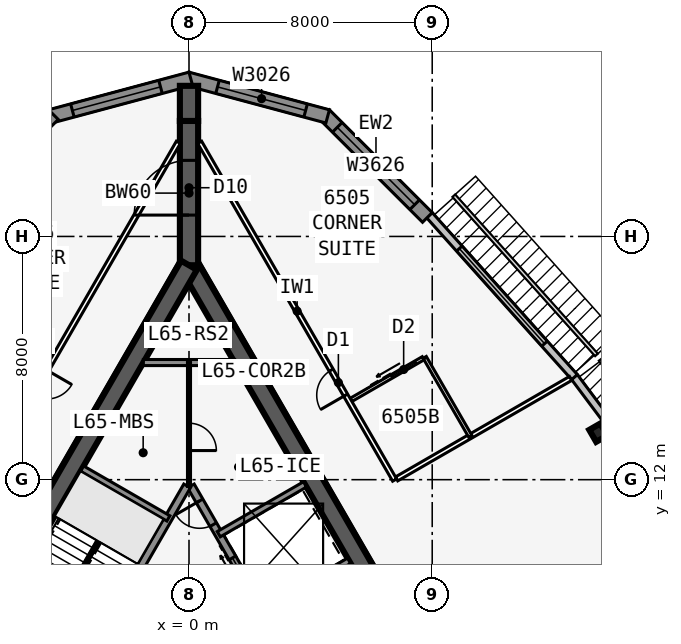
"""IFC4 building model, lengths in metres.
Left out: names, types, materials, properties, quantities, classifications, styles, units other than length and angle.
Written with IfcOpenShell. Run it as: python <this file> out.ifc"""

import sys

from ifc_helpers import new_model, si_unit, direction, frame, frame_2d, origin, origin_2d, place, context, subcontext, project, spatial, polyline, rectangle, i_section, outline, extrude, element, fill, save


model = new_model("IFC4")
c1 = context("Model", 3, precision=1e-05, world=origin(), true_north=direction((0.0, 1.0)))
c2 = subcontext(c1, "Body", "Model", "MODEL_VIEW")
j1 = project(units=[si_unit("LENGTHUNIT", "METRE"), si_unit("PLANEANGLEUNIT", "RADIAN")], contexts=[c1])
p1 = place(None, origin())
s1 = spatial("IfcSite", under=j1, at=p1, CompositionType="ELEMENT")
p2 = place(p1, origin())
s2 = spatial("IfcBuilding", under=s1, at=p2, CompositionType="ELEMENT")
p3 = place(p2, frame((0.0, 0.0, 246.5)))
s3 = spatial("IfcBuildingStorey", under=s2, at=p3, CompositionType="ELEMENT", Elevation=246.5)
p4 = place(p3, frame((16.5, -9.526, 0.0), z_axis=(0.0, 0.0, 1.0), x_axis=(-0.499999749417, 0.866025548458, 0.0)))
e1 = element("IfcWall", 1, at=p4, inside=s3, PredefinedType="SHEAR", context=c2, shape_type="SweptSolid", body=[
    extrude(rectangle(XDim=33.0, YDim=0.6, at=frame_2d((16.5, 0.0))), origin(), (0.0, 0.0, 1.0), 3.6),
])
p5 = place(p4, frame((14.15, 0.0, 0.0)))
e2 = element("IfcOpeningElement", 2, at=p5, cuts=e1, PredefinedType="OPENING", context=c2, shape_type="SweptSolid", body=[
    extrude(rectangle(XDim=1.8, YDim=2.13, at=frame_2d((0.9, 1.065))), frame((0.0, 0.31, 0.0), z_axis=(0.0, -1.0, 0.0), x_axis=(1.0, 0.0, 0.0)), (0.0, 0.0, 1.0), 0.62),
])
p6 = place(p4, frame((12.6, 0.0, 0.0)))
e3 = element("IfcOpeningElement", 3, at=p6, cuts=e1, PredefinedType="OPENING", context=c2, shape_type="SweptSolid", body=[
    extrude(rectangle(XDim=1.0, YDim=2.13, at=frame_2d((0.5, 1.065))), frame((0.0, 0.31, 0.0), z_axis=(0.0, -1.0, 0.0), x_axis=(1.0, 0.0, 0.0)), (0.0, 0.0, 1.0), 0.62),
])
p7 = place(p3, frame((5.379, 2.586, 0.0), z_axis=(0.0, 0.0, 1.0), x_axis=(-0.500001375892, 0.866024609411, 0.0)))
e4 = element("IfcWall", 4, at=p7, inside=s3, PredefinedType="SOLIDWALL", context=c2, shape_type="SweptSolid", body=[
    extrude(rectangle(XDim=10.633, YDim=0.25, at=frame_2d((5.316, 0.0))), origin(), (0.0, 0.0, 1.0), 3.435),
])
p8 = place(p7, frame((9.164, 0.0, 0.0)))
e5 = element("IfcOpeningElement", 5, at=p8, cuts=e4, PredefinedType="OPENING", context=c2, shape_type="SweptSolid", body=[
    extrude(rectangle(XDim=0.9, YDim=2.13, at=frame_2d((0.45, 1.065))), frame((0.0, 0.135, 0.0), z_axis=(0.0, -1.0, 0.0), x_axis=(1.0, 0.0, 0.0)), (0.0, 0.0, 1.0), 0.27),
])
p9 = place(p7, frame((1.0, 0.0, 0.0)))
e6 = element("IfcOpeningElement", 6, at=p9, cuts=e4, PredefinedType="OPENING", context=c2, shape_type="SweptSolid", body=[
    extrude(rectangle(XDim=1.1, YDim=2.13, at=frame_2d((0.55, 1.065))), frame((0.0, 0.135, 0.0), z_axis=(0.0, -1.0, 0.0), x_axis=(1.0, 0.0, 0.0)), (0.0, 0.0, 1.0), 0.27),
])
p10 = place(p7, frame((3.9, 0.0, 0.0)))
e7 = element("IfcOpeningElement", 7, at=p10, cuts=e4, PredefinedType="OPENING", context=c2, shape_type="SweptSolid", body=[
    extrude(rectangle(XDim=1.1, YDim=2.13, at=frame_2d((0.55, 1.065))), frame((0.0, 0.135, 0.0), z_axis=(0.0, -1.0, 0.0), x_axis=(1.0, 0.0, 0.0)), (0.0, 0.0, 1.0), 0.27),
])
p11 = place(p7, frame((6.8, 0.0, 0.0)))
e8 = element("IfcOpeningElement", 8, at=p11, cuts=e4, PredefinedType="OPENING", context=c2, shape_type="SweptSolid", body=[
    extrude(rectangle(XDim=1.1, YDim=2.13, at=frame_2d((0.55, 1.065))), frame((0.0, 0.135, 0.0), z_axis=(0.0, -1.0, 0.0), x_axis=(1.0, 0.0, 0.0)), (0.0, 0.0, 1.0), 0.27),
])
for number, where, z_axis, x_axis in (
    (9, (2.429, 7.696, 0.0), (0.0, 0.0, 1.0), (0.866, 0.5, 0.0)),
    (10, (0.979, 10.207, 0.0), (0.0, 0.0, 1.0), (0.866, 0.5, 0.0)),
):
    element("IfcWall", number, at=place(p3, frame(where, z_axis=z_axis, x_axis=x_axis)), inside=s3, PredefinedType="SOLIDWALL", context=c2, shape_type="SweptSolid", body=[
        extrude(rectangle(XDim=3.275, YDim=0.2, at=frame_2d((1.637, 0.0))), origin(), (0.0, 0.0, 1.0), 3.435),
    ])
p12 = place(p3, frame((0.0, 19.052, 0.0), z_axis=(0.0, 0.0, 1.0), x_axis=(-0.499999749417, -0.866025548458, 0.0)))
e11 = element("IfcWall", 11, at=p12, inside=s3, PredefinedType="SHEAR", context=c2, shape_type="SweptSolid", body=[
    extrude(rectangle(XDim=33.0, YDim=0.6, at=frame_2d((16.5, 0.0))), origin(), (0.0, 0.0, 1.0), 3.6),
])
p13 = place(p12, frame((14.15, 0.0, 0.0)))
e12 = element("IfcOpeningElement", 12, at=p13, cuts=e11, PredefinedType="OPENING", context=c2, shape_type="SweptSolid", body=[
    extrude(rectangle(XDim=1.8, YDim=2.13, at=frame_2d((0.9, 1.065))), frame((0.0, 0.31, 0.0), z_axis=(0.0, -1.0, 0.0), x_axis=(1.0, 0.0, 0.0)), (0.0, 0.0, 1.0), 0.62),
])
p14 = place(p12, frame((12.6, 0.0, 0.0)))
e13 = element("IfcOpeningElement", 13, at=p14, cuts=e11, PredefinedType="OPENING", context=c2, shape_type="SweptSolid", body=[
    extrude(rectangle(XDim=1.0, YDim=2.13, at=frame_2d((0.5, 1.065))), frame((0.0, 0.31, 0.0), z_axis=(0.0, -1.0, 0.0), x_axis=(1.0, 0.0, 0.0)), (0.0, 0.0, 1.0), 0.62),
])
p15 = place(p3, frame((-0.062, 11.794, 0.0), z_axis=(0.0, 0.0, 1.0), x_axis=(-0.500006680225, -0.86602154692, 0.0)))
e14 = element("IfcWall", 14, at=p15, inside=s3, PredefinedType="SOLIDWALL", context=c2, shape_type="SweptSolid", body=[
    extrude(rectangle(XDim=7.733, YDim=0.25, at=frame_2d((3.866, 0.0))), origin(), (0.0, 0.0, 1.0), 3.435),
])
p16 = place(p3, frame((-0.679, 10.727, 0.0), z_axis=(0.0, 0.0, 1.0), x_axis=(-0.866027924134, 0.499995634601, 0.0)))
e15 = element("IfcWall", 15, at=p16, inside=s3, PredefinedType="SOLIDWALL", context=c2, shape_type="SweptSolid", body=[
    extrude(rectangle(XDim=3.275, YDim=0.2, at=frame_2d((1.637, 0.0))), origin(), (0.0, 0.0, 1.0), 3.435),
])
p17 = place(p3, frame((0.0, 19.052, 0.0), z_axis=(0.0, 0.0, 1.0), x_axis=(0.0, 1.0, 0.0)))
e16 = element("IfcWall", 16, at=p17, inside=s3, PredefinedType="SHEAR", context=c2, shape_type="SweptSolid", body=[
    extrude(rectangle(XDim=4.746, YDim=0.6, at=frame_2d((2.373, 0.0))), origin(), (0.0, 0.0, 1.0), 3.6),
])
p18 = place(p17, frame((1.65, 0.0, 0.0)))
e17 = element("IfcOpeningElement", 17, at=p18, cuts=e16, PredefinedType="OPENING", context=c2, shape_type="SweptSolid", body=[
    extrude(rectangle(XDim=1.8, YDim=2.13, at=frame_2d((0.9, 1.065))), frame((0.0, 0.31, 0.0), z_axis=(0.0, -1.0, 0.0), x_axis=(1.0, 0.0, 0.0)), (0.0, 0.0, 1.0), 0.62),
])
p19 = place(p3, frame((0.0, 23.799, 0.0), z_axis=(0.0, 0.0, 1.0), x_axis=(0.0, 1.0, 0.0)))
e18 = element("IfcWall", 18, at=p19, inside=s3, PredefinedType="SHEAR", context=c2, shape_type="SweptSolid", body=[
    extrude(rectangle(XDim=1.155, YDim=0.6, at=frame_2d((0.577, 0.0))), origin(), (0.0, 0.0, 1.0), 3.6),
])
p20 = place(p3, frame((13.461, 13.545, 0.0), z_axis=(0.0, 0.0, 1.0), x_axis=(0.866025403784, 0.5, 0.0)))
e19 = element("IfcColumn", 19, at=p20, inside=s3, PredefinedType="COLUMN", context=c2, shape_type="SweptSolid", body=[
    extrude(i_section(OverallWidth=0.419, OverallDepth=0.455, WebThickness=0.042, FlangeThickness=0.068, at=origin_2d()), origin(), (0.0, 0.0, 1.0), 3.6),
])
p21 = place(p3, frame((13.881, 13.771, 0.0), z_axis=(0.0, 0.0, 1.0), x_axis=(-0.599650843534, 0.800261748335, 0.0)))
e20 = element("IfcWall", 20, at=p21, inside=s3, PredefinedType="STANDARD", context=c2, shape_type="SweptSolid", body=[
    extrude(rectangle(XDim=2.014, YDim=0.25, at=frame_2d((1.007, 0.0))), origin(), (0.0, 0.0, 1.0), 3.435),
])
p22 = place(p3, frame((12.68, 15.374, 0.0), z_axis=(0.0, 0.0, 1.0), x_axis=(-0.667303550892, 0.744785855778, 0.0)))
e21 = element("IfcWall", 21, at=p22, inside=s3, PredefinedType="STANDARD", context=c2, shape_type="SweptSolid", body=[
    extrude(rectangle(XDim=7.153, YDim=0.25, at=frame_2d((3.576, 0.0))), origin(), (0.0, 0.0, 1.0), 3.435),
])
p23 = place(p22, frame((1.476, 0.0, 0.45)))
e22 = element("IfcOpeningElement", 22, at=p23, cuts=e21, PredefinedType="OPENING", context=c2, shape_type="SweptSolid", body=[
    extrude(rectangle(XDim=4.2, YDim=2.6, at=frame_2d((2.1, 1.3))), frame((0.0, 0.135, 0.0), z_axis=(0.0, -1.0, 0.0), x_axis=(1.0, 0.0, 0.0)), (0.0, 0.0, 1.0), 0.27),
])
p24 = place(p3, frame((7.841, 20.625, 0.0), z_axis=(0.0, 0.0, 1.0), x_axis=(-0.707106781187, 0.707106781187, 0.0)))
e23 = element("IfcWall", 23, at=p24, inside=s3, PredefinedType="SOLIDWALL", context=c2, shape_type="SweptSolid", body=[
    extrude(rectangle(XDim=4.781, YDim=0.45, at=frame_2d((2.391, 0.0))), origin(), (0.0, 0.0, 1.0), 3.435),
])
p25 = place(p24, frame((0.591, 0.0, 0.45)))
e24 = element("IfcOpeningElement", 24, at=p25, cuts=e23, PredefinedType="OPENING", context=c2, shape_type="SweptSolid", body=[
    extrude(rectangle(XDim=3.6, YDim=2.6, at=frame_2d((1.8, 1.3))), frame((0.0, 0.235, 0.0), z_axis=(0.0, -1.0, 0.0), x_axis=(1.0, 0.0, 0.0)), (0.0, 0.0, 1.0), 0.47),
])
p26 = place(p3, frame((4.561, 23.948, 0.0), z_axis=(0.0, 0.0, 1.0), x_axis=(-0.965926628191, 0.258816052347, 0.0)))
e25 = element("IfcWall", 25, at=p26, inside=s3, PredefinedType="SOLIDWALL", context=c2, shape_type="SweptSolid", body=[
    extrude(outline(polyline([(4.781, 0.225), (4.722, 0.225), (4.375, 0.132), (4.351, 0.225), (0.0, 0.225), (0.0, -0.225), (4.781, -0.225), (4.781, 0.225)])), origin(), (0.0, 0.0, 1.0), 3.435),
])
p27 = place(p26, frame((0.75, 0.0, 0.45)))
e26 = element("IfcOpeningElement", 26, at=p27, cuts=e25, PredefinedType="OPENING", context=c2, shape_type="SweptSolid", body=[
    extrude(rectangle(XDim=3.0, YDim=2.6, at=frame_2d((1.5, 1.3))), frame((0.0, 0.235, 0.0), z_axis=(0.0, -1.0, 0.0), x_axis=(1.0, 0.0, 0.0)), (0.0, 0.0, 1.0), 0.47),
])
p28 = place(p3, frame((0.058, 25.186, 0.0), z_axis=(0.0, 0.0, 1.0), x_axis=(-0.965926628191, -0.258816052347, 0.0)))
e27 = element("IfcWall", 27, at=p28, inside=s3, PredefinedType="SOLIDWALL", context=c2, shape_type="SweptSolid", body=[
    extrude(outline(polyline([(4.781, 0.225), (0.431, 0.225), (0.406, 0.132), (0.059, 0.225), (0.0, 0.225), (0.0, -0.225), (4.781, -0.225), (4.781, 0.225)])), origin(), (0.0, 0.0, 1.0), 3.435),
])
p29 = place(p28, frame((1.031, 0.0, 0.45)))
e28 = element("IfcOpeningElement", 28, at=p29, cuts=e27, PredefinedType="OPENING", context=c2, shape_type="SweptSolid", body=[
    extrude(rectangle(XDim=3.0, YDim=2.6, at=frame_2d((1.5, 1.3))), frame((0.0, 0.235, 0.0), z_axis=(0.0, -1.0, 0.0), x_axis=(1.0, 0.0, 0.0)), (0.0, 0.0, 1.0), 0.47),
])
p30 = place(p3, frame((-4.46, 24.007, 0.0), z_axis=(0.0, 0.0, 1.0), x_axis=(-0.707106781187, -0.707106781187, 0.0)))
e29 = element("IfcWall", 29, at=p30, inside=s3, PredefinedType="SOLIDWALL", context=c2, shape_type="SweptSolid", body=[
    extrude(rectangle(XDim=4.781, YDim=0.45, at=frame_2d((2.391, 0.0))), origin(), (0.0, 0.0, 1.0), 3.435),
])
p31 = place(p30, frame((0.591, 0.0, 0.45)))
e30 = element("IfcOpeningElement", 30, at=p31, cuts=e29, PredefinedType="OPENING", context=c2, shape_type="SweptSolid", body=[
    extrude(rectangle(XDim=3.6, YDim=2.6, at=frame_2d((1.8, 1.3))), frame((0.0, 0.235, 0.0), z_axis=(0.0, -1.0, 0.0), x_axis=(1.0, 0.0, 0.0)), (0.0, 0.0, 1.0), 0.47),
])
p32 = place(p3, frame((6.763, 11.988, 0.0), z_axis=(0.0, 0.0, 1.0), x_axis=(-0.499993758181, 0.86602900747, 0.0)))
e31 = element("IfcWall", 31, at=p32, inside=s3, PredefinedType="PARTITIONING", context=c2, shape_type="SweptSolid", body=[
    extrude(rectangle(XDim=12.827, YDim=0.15, at=frame_2d((6.414, 0.0))), origin(), (0.0, 0.0, 1.0), 3.435),
])
p33 = place(p32, frame((3.225, 0.0, 0.0)))
e32 = element("IfcOpeningElement", 32, at=p33, cuts=e31, PredefinedType="OPENING", context=c2, shape_type="SweptSolid", body=[
    extrude(rectangle(XDim=0.95, YDim=2.13, at=frame_2d((0.475, 1.065))), frame((0.0, 0.085, 0.0), z_axis=(0.0, -1.0, 0.0), x_axis=(1.0, 0.0, 0.0)), (0.0, 0.0, 1.0), 0.17),
])
p34 = place(p3, frame((6.829, 12.025, 0.0), z_axis=(0.0, 0.0, 1.0), x_axis=(0.866029323189, 0.499993211332, 0.0)))
e33 = element("IfcWall", 33, at=p34, inside=s3, PredefinedType="PARTITIONING", context=c2, shape_type="SweptSolid", body=[
    extrude(rectangle(XDim=6.608, YDim=0.15, at=frame_2d((3.304, 0.0))), origin(), (0.0, 0.0, 1.0), 2.678),
])
p35 = place(p3, frame((9.253, 13.425, 0.0), z_axis=(0.0, 0.0, 1.0), x_axis=(-0.499990139034, 0.866031096941, 0.0)))
e34 = element("IfcWall", 34, at=p35, inside=s3, PredefinedType="PLUMBINGWALL", context=c2, shape_type="SweptSolid", body=[
    extrude(rectangle(XDim=3.0, YDim=0.12, at=frame_2d((1.5, 0.0))), origin(), (0.0, 0.0, 1.0), 3.435),
])
p36 = place(p3, frame((5.329, 14.623, 0.0), z_axis=(0.0, 0.0, 1.0), x_axis=(0.865997131366, 0.500048966069, 0.0)))
e35 = element("IfcWall", 35, at=p36, inside=s3, PredefinedType="PLUMBINGWALL", context=c2, shape_type="SweptSolid", body=[
    extrude(rectangle(XDim=2.74, YDim=0.12, at=frame_2d((1.37, 0.0))), origin(), (0.0, 0.0, 1.0), 3.435),
])
p37 = place(p36, frame((1.55, 0.0, 0.0)))
e36 = element("IfcOpeningElement", 36, at=p37, cuts=e35, PredefinedType="OPENING", context=c2, shape_type="SweptSolid", body=[
    extrude(rectangle(XDim=0.9, YDim=2.13, at=frame_2d((0.45, 1.065))), frame((0.0, 0.07, 0.0), z_axis=(0.0, -1.0, 0.0), x_axis=(1.0, 0.0, 0.0)), (0.0, 0.0, 1.0), 0.14),
])
p38 = place(p3, frame((-0.35, 23.096, 0.0), z_axis=(0.0, 0.0, 1.0), x_axis=(-0.499998875317, -0.866026053119, 0.0)))
e37 = element("IfcWall", 37, at=p38, inside=s3, PredefinedType="PARTITIONING", context=c2, shape_type="SweptSolid", body=[
    extrude(rectangle(XDim=39.654, YDim=0.15, at=frame_2d((19.827, 0.0))), origin(), (0.0, 0.0, 1.0), 3.435),
])
p39 = place(p38, frame((8.652, 0.0, 0.0)))
e38 = element("IfcOpeningElement", 38, at=p39, cuts=e37, PredefinedType="OPENING", context=c2, shape_type="SweptSolid", body=[
    extrude(rectangle(XDim=0.95, YDim=2.13, at=frame_2d((0.475, 1.065))), frame((0.0, 0.085, 0.0), z_axis=(0.0, -1.0, 0.0), x_axis=(1.0, 0.0, 0.0)), (0.0, 0.0, 1.0), 0.17),
])
p40 = place(p38, frame((16.052, 0.0, 0.0)))
e39 = element("IfcOpeningElement", 39, at=p40, cuts=e37, PredefinedType="OPENING", context=c2, shape_type="SweptSolid", body=[
    extrude(rectangle(XDim=0.95, YDim=2.13, at=frame_2d((0.475, 1.065))), frame((0.0, 0.085, 0.0), z_axis=(0.0, -1.0, 0.0), x_axis=(1.0, 0.0, 0.0)), (0.0, 0.0, 1.0), 0.17),
])
p41 = place(p38, frame((23.052, 0.0, 0.0)))
e40 = element("IfcOpeningElement", 40, at=p41, cuts=e37, PredefinedType="OPENING", context=c2, shape_type="SweptSolid", body=[
    extrude(rectangle(XDim=0.95, YDim=2.13, at=frame_2d((0.475, 1.065))), frame((0.0, 0.085, 0.0), z_axis=(0.0, -1.0, 0.0), x_axis=(1.0, 0.0, 0.0)), (0.0, 0.0, 1.0), 0.17),
])
p42 = place(p38, frame((30.052, 0.0, 0.0)))
e41 = element("IfcOpeningElement", 41, at=p42, cuts=e37, PredefinedType="OPENING", context=c2, shape_type="SweptSolid", body=[
    extrude(rectangle(XDim=0.95, YDim=2.13, at=frame_2d((0.475, 1.065))), frame((0.0, 0.085, 0.0), z_axis=(0.0, -1.0, 0.0), x_axis=(1.0, 0.0, 0.0)), (0.0, 0.0, 1.0), 0.17),
])
p43 = place(p3, frame((-1.501, 15.853, 0.0), z_axis=(0.0, 0.0, 1.0), x_axis=(1.0, 0.0, 0.0)))
e42 = element("IfcWall", 42, at=p43, inside=s3, PredefinedType="SOLIDWALL", context=c2, shape_type="SweptSolid", body=[
    extrude(rectangle(XDim=3.002, YDim=0.2, at=frame_2d((1.501, 0.0))), origin(), (0.0, 0.0, 1.0), 3.435),
])
p44 = place(p3, frame((0.0, 15.853, 0.0), z_axis=(0.0, 0.0, 1.0), x_axis=(0.0, -1.0, 0.0)))
e43 = element("IfcWall", 43, at=p44, inside=s3, PredefinedType="PARTITIONING", context=c2, shape_type="SweptSolid", body=[
    extrude(rectangle(XDim=4.075, YDim=0.1, at=frame_2d((2.038, 0.0))), origin(), (0.0, 0.0, 1.0), 3.435),
])
p45 = place(p44, frame((1.995, 0.0, 0.0)))
e44 = element("IfcOpeningElement", 44, at=p45, cuts=e43, PredefinedType="OPENING", context=c2, shape_type="SweptSolid", body=[
    extrude(rectangle(XDim=0.9, YDim=2.13, at=frame_2d((0.45, 1.065))), frame((0.0, 0.06, 0.0), z_axis=(0.0, -1.0, 0.0), x_axis=(1.0, 0.0, 0.0)), (0.0, 0.0, 1.0), 0.12),
])
p46 = place(p3, frame((-2.988, 9.978, 0.0), z_axis=(0.0, 0.0, 1.0), x_axis=(-0.499992232847, -0.866029888106, 0.0)))
e45 = element("IfcWall", 45, at=p46, inside=s3, PredefinedType="SOLIDWALL", context=c2, shape_type="SweptSolid", body=[
    extrude(rectangle(XDim=2.794, YDim=0.1, at=frame_2d((1.397, 0.0))), origin(), (0.0, 0.0, 1.0), 3.6),
])
p47 = place(p23, origin())
e46 = element("IfcWindow", 46, at=p47, inside=s3, PartitioningType="SINGLE_PANEL", PredefinedType="WINDOW", context=c2, shape_type="SweptSolid", body=[
    extrude(rectangle(XDim=4.2, YDim=2.6, at=frame_2d((2.1, 1.3))), frame((0.0, 0.03, 0.0), z_axis=(0.0, -1.0, 0.0), x_axis=(1.0, 0.0, 0.0)), (0.0, 0.0, 1.0), 0.06),
])
fill(e22, e46)
p48 = place(p25, origin())
e47 = element("IfcWindow", 47, at=p48, inside=s3, PartitioningType="SINGLE_PANEL", PredefinedType="WINDOW", context=c2, shape_type="SweptSolid", body=[
    extrude(rectangle(XDim=3.6, YDim=2.6, at=frame_2d((1.8, 1.3))), frame((0.0, 0.03, 0.0), z_axis=(0.0, -1.0, 0.0), x_axis=(1.0, 0.0, 0.0)), (0.0, 0.0, 1.0), 0.06),
])
fill(e24, e47)
p49 = place(p27, origin())
e48 = element("IfcWindow", 48, at=p49, inside=s3, PartitioningType="SINGLE_PANEL", PredefinedType="WINDOW", context=c2, shape_type="SweptSolid", body=[
    extrude(rectangle(XDim=3.0, YDim=2.6, at=frame_2d((1.5, 1.3))), frame((0.0, 0.03, 0.0), z_axis=(0.0, -1.0, 0.0), x_axis=(1.0, 0.0, 0.0)), (0.0, 0.0, 1.0), 0.06),
])
fill(e26, e48)
p50 = place(p29, origin())
e49 = element("IfcWindow", 49, at=p50, inside=s3, PartitioningType="SINGLE_PANEL", PredefinedType="WINDOW", context=c2, shape_type="SweptSolid", body=[
    extrude(rectangle(XDim=3.0, YDim=2.6, at=frame_2d((1.5, 1.3))), frame((0.0, 0.03, 0.0), z_axis=(0.0, -1.0, 0.0), x_axis=(1.0, 0.0, 0.0)), (0.0, 0.0, 1.0), 0.06),
])
fill(e28, e49)
p51 = place(p37, origin())
e50 = element("IfcDoor", 50, at=p51, inside=s3, OperationType="SLIDING_TO_LEFT", PredefinedType="DOOR", context=c2, shape_type="SweptSolid", body=[
    extrude(rectangle(XDim=0.9, YDim=2.13, at=frame_2d((0.45, 1.065))), frame((0.0, 0.025, 0.0), z_axis=(0.0, -1.0, 0.0), x_axis=(1.0, 0.0, 0.0)), (0.0, 0.0, 1.0), 0.05),
])
fill(e36, e50)
p52 = place(p33, origin())
e51 = element("IfcDoor", 51, at=p52, inside=s3, OperationType="SINGLE_SWING_LEFT", PredefinedType="DOOR", context=c2, shape_type="SweptSolid", body=[
    extrude(rectangle(XDim=0.95, YDim=2.13, at=frame_2d((0.475, 1.065))), frame((0.0, 0.025, 0.0), z_axis=(0.0, -1.0, 0.0), x_axis=(1.0, 0.0, 0.0)), (0.0, 0.0, 1.0), 0.05),
])
fill(e32, e51)
p53 = place(p18, origin())
e52 = element("IfcDoor", 52, at=p53, inside=s3, OperationType="DOUBLE_DOOR_DOUBLE_SWING", PredefinedType="DOOR", context=c2, shape_type="SweptSolid", body=[
    extrude(rectangle(XDim=1.8, YDim=2.13, at=frame_2d((0.9, 1.065))), frame((0.0, 0.025, 0.0), z_axis=(0.0, -1.0, 0.0), x_axis=(1.0, 0.0, 0.0)), (0.0, 0.0, 1.0), 0.05),
])
fill(e17, e52)
p54 = place(p8, origin())
e53 = element("IfcDoor", 53, at=p54, inside=s3, OperationType="SINGLE_SWING_RIGHT", PredefinedType="DOOR", context=c2, shape_type="SweptSolid", body=[
    extrude(rectangle(XDim=0.9, YDim=2.13, at=frame_2d((0.45, 1.065))), frame((0.0, 0.025, 0.0), z_axis=(0.0, -1.0, 0.0), x_axis=(1.0, 0.0, 0.0)), (0.0, 0.0, 1.0), 0.05),
])
fill(e5, e53)
p55 = place(p45, origin())
e54 = element("IfcDoor", 54, at=p55, inside=s3, OperationType="SINGLE_SWING_RIGHT", PredefinedType="DOOR", context=c2, shape_type="SweptSolid", body=[
    extrude(rectangle(XDim=0.9, YDim=2.13, at=frame_2d((0.45, 1.065))), frame((0.0, 0.025, 0.0), z_axis=(0.0, -1.0, 0.0), x_axis=(1.0, 0.0, 0.0)), (0.0, 0.0, 1.0), 0.05),
])
fill(e44, e54)
p56 = place(p11, origin())
e55 = element("IfcDoor", 55, at=p56, inside=s3, OperationType="DOUBLE_DOOR_SLIDING", PredefinedType="USERDEFINED", context=c2, shape_type="SweptSolid", body=[
    extrude(rectangle(XDim=1.1, YDim=2.13, at=frame_2d((0.55, 1.065))), frame((0.0, 0.025, 0.0), z_axis=(0.0, -1.0, 0.0), x_axis=(1.0, 0.0, 0.0)), (0.0, 0.0, 1.0), 0.05),
])
fill(e8, e55)
save(model, sys.argv[1])
